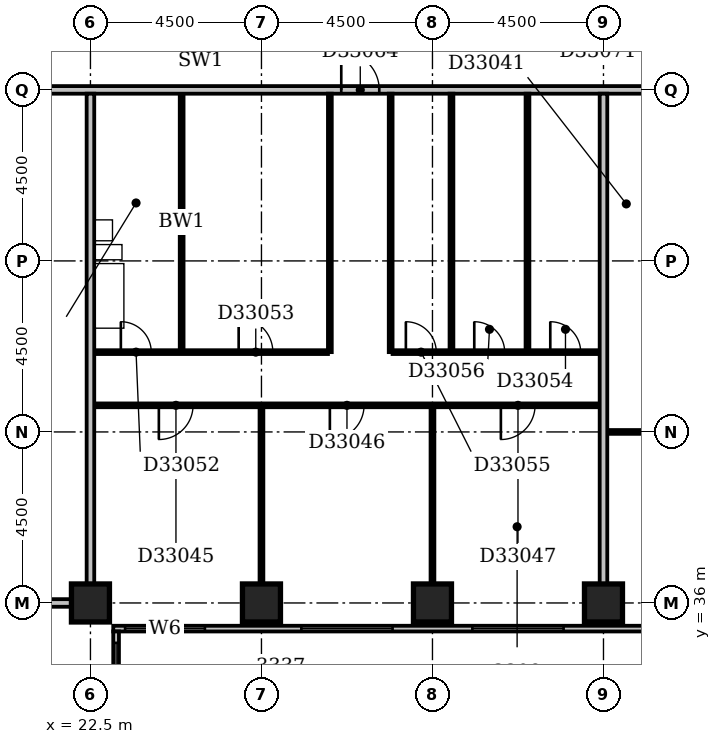
"""IFC4 building model, lengths in metres.
Left out: names, types, materials, properties, quantities, classifications, styles, units other than length and angle.
Written with IfcOpenShell. Run it as: python <this file> out.ifc"""

import sys

from ifc_helpers import new_model, si_unit, direction, frame, frame_2d, origin, origin_2d, place, context, subcontext, project, spatial, rectangle, extrude, element, fill, save


model = new_model("IFC4")
c1 = context("Model", 3, precision=1e-05, world=origin(), true_north=direction((0.0, 1.0)))
c2 = subcontext(c1, "Body", "Model", "MODEL_VIEW")
j1 = project(units=[si_unit("LENGTHUNIT", "METRE"), si_unit("PLANEANGLEUNIT", "RADIAN")], contexts=[c1])
p1 = place(None, origin())
s1 = spatial("IfcSite", under=j1, at=p1, CompositionType="ELEMENT")
p2 = place(p1, origin())
s2 = spatial("IfcBuilding", under=s1, at=p2, CompositionType="ELEMENT")
p3 = place(p2, frame((0.0, 0.0, 134.0)))
s3 = spatial("IfcBuildingStorey", under=s2, at=p3, CompositionType="ELEMENT", Elevation=134.0)
for number, where, z_axis, x_axis in (
    (1, (22.5, 36.0, -0.3), (0.0, 0.0, 1.0), (1.0, 0.0, 0.0)),
    (2, (27.0, 36.0, -0.3), (0.0, 0.0, 1.0), (1.0, 0.0, 0.0)),
    (3, (31.5, 36.0, -0.3), (0.0, 0.0, 1.0), (1.0, 0.0, 0.0)),
    (4, (36.0, 36.0, -0.3), (0.0, 0.0, 1.0), (1.0, 0.0, 0.0)),
):
    element("IfcColumn", number, at=place(p3, frame(where, z_axis=z_axis, x_axis=x_axis)), inside=s3, PredefinedType="COLUMN", context=c2, shape_type="SweptSolid", body=[
        extrude(rectangle(XDim=1.0, YDim=1.0, at=origin_2d()), origin(), (0.0, 0.0, 1.0), 3.6),
    ])
p4 = place(p3, frame((23.175, 17.4, 0.0), z_axis=(0.0, 0.0, 1.0), x_axis=(0.0, 1.0, 0.0)))
e5 = element("IfcWall", 5, at=p4, inside=s3, PredefinedType="STANDARD", context=c2, shape_type="SweptSolid", body=[
    extrude(rectangle(XDim=17.85, YDim=0.15, at=frame_2d((8.925, 0.0))), origin(), (0.0, 0.0, 1.0), 2.7),
])
p5 = place(p4, frame((1.385, 0.0, 0.6)))
e6 = element("IfcOpeningElement", 6, at=p5, cuts=e5, PredefinedType="OPENING", context=c2, shape_type="SweptSolid", body=[
    extrude(rectangle(XDim=2.1, YDim=1.8, at=frame_2d((1.05, 0.9))), frame((0.0, 0.087, 0.0), z_axis=(0.0, -1.0, 0.0), x_axis=(1.0, 0.0, 0.0)), (0.0, 0.0, 1.0), 0.174),
])
p6 = place(p4, frame((6.15, 0.0, 0.6)))
e7 = element("IfcOpeningElement", 7, at=p6, cuts=e5, PredefinedType="OPENING", context=c2, shape_type="SweptSolid", body=[
    extrude(rectangle(XDim=2.4, YDim=1.8, at=frame_2d((1.2, 0.9))), frame((0.0, 0.087, 0.0), z_axis=(0.0, -1.0, 0.0), x_axis=(1.0, 0.0, 0.0)), (0.0, 0.0, 1.0), 0.174),
])
p7 = place(p4, frame((10.65, 0.0, 0.6)))
e8 = element("IfcOpeningElement", 8, at=p7, cuts=e5, PredefinedType="OPENING", context=c2, shape_type="SweptSolid", body=[
    extrude(rectangle(XDim=2.4, YDim=1.8, at=frame_2d((1.2, 0.9))), frame((0.0, 0.087, 0.0), z_axis=(0.0, -1.0, 0.0), x_axis=(1.0, 0.0, 0.0)), (0.0, 0.0, 1.0), 0.174),
])
p8 = place(p4, frame((15.15, 0.0, 0.6)))
e9 = element("IfcOpeningElement", 9, at=p8, cuts=e5, PredefinedType="OPENING", context=c2, shape_type="SweptSolid", body=[
    extrude(rectangle(XDim=2.4, YDim=1.8, at=frame_2d((1.2, 0.9))), frame((0.0, 0.087, 0.0), z_axis=(0.0, -1.0, 0.0), x_axis=(1.0, 0.0, 0.0)), (0.0, 0.0, 1.0), 0.174),
])
p9 = place(p3, frame((23.1, 35.325, 0.0), z_axis=(0.0, 0.0, 1.0), x_axis=(1.0, 0.0, 0.0)))
e10 = element("IfcWall", 10, at=p9, inside=s3, PredefinedType="STANDARD", context=c2, shape_type="SweptSolid", body=[
    extrude(rectangle(XDim=45.15, YDim=0.15, at=frame_2d((22.575, 0.0))), origin(), (0.0, 0.0, 1.0), 2.7),
])
p10 = place(p9, frame((0.312, 0.0, 0.6)))
e11 = element("IfcOpeningElement", 11, at=p10, cuts=e10, PredefinedType="OPENING", context=c2, shape_type="SweptSolid", body=[
    extrude(rectangle(XDim=2.1, YDim=1.8, at=frame_2d((1.05, 0.9))), frame((0.0, 0.087, 0.0), z_axis=(0.0, -1.0, 0.0), x_axis=(1.0, 0.0, 0.0)), (0.0, 0.0, 1.0), 0.174),
])
p11 = place(p9, frame((4.95, 0.0, 0.6)))
e12 = element("IfcOpeningElement", 12, at=p11, cuts=e10, PredefinedType="OPENING", context=c2, shape_type="SweptSolid", body=[
    extrude(rectangle(XDim=2.4, YDim=1.8, at=frame_2d((1.2, 0.9))), frame((0.0, 0.087, 0.0), z_axis=(0.0, -1.0, 0.0), x_axis=(1.0, 0.0, 0.0)), (0.0, 0.0, 1.0), 0.174),
])
p12 = place(p9, frame((9.45, 0.0, 0.6)))
e13 = element("IfcOpeningElement", 13, at=p12, cuts=e10, PredefinedType="OPENING", context=c2, shape_type="SweptSolid", body=[
    extrude(rectangle(XDim=2.4, YDim=1.8, at=frame_2d((1.2, 0.9))), frame((0.0, 0.087, 0.0), z_axis=(0.0, -1.0, 0.0), x_axis=(1.0, 0.0, 0.0)), (0.0, 0.0, 1.0), 0.174),
])
p13 = place(p9, frame((13.95, 0.0, 0.6)))
e14 = element("IfcOpeningElement", 14, at=p13, cuts=e10, PredefinedType="OPENING", context=c2, shape_type="SweptSolid", body=[
    extrude(rectangle(XDim=2.4, YDim=1.8, at=frame_2d((1.2, 0.9))), frame((0.0, 0.087, 0.0), z_axis=(0.0, -1.0, 0.0), x_axis=(1.0, 0.0, 0.0)), (0.0, 0.0, 1.0), 0.174),
])
p14 = place(p9, frame((18.45, 0.0, 0.6)))
e15 = element("IfcOpeningElement", 15, at=p14, cuts=e10, PredefinedType="OPENING", context=c2, shape_type="SweptSolid", body=[
    extrude(rectangle(XDim=2.4, YDim=1.8, at=frame_2d((1.2, 0.9))), frame((0.0, 0.087, 0.0), z_axis=(0.0, -1.0, 0.0), x_axis=(1.0, 0.0, 0.0)), (0.0, 0.0, 1.0), 0.174),
])
p15 = place(p9, frame((24.146, 0.0, 0.6)))
e16 = element("IfcOpeningElement", 16, at=p15, cuts=e10, PredefinedType="OPENING", context=c2, shape_type="SweptSolid", body=[
    extrude(rectangle(XDim=1.5, YDim=1.8, at=frame_2d((0.75, 0.9))), frame((0.0, 0.087, 0.0), z_axis=(0.0, -1.0, 0.0), x_axis=(1.0, 0.0, 0.0)), (0.0, 0.0, 1.0), 0.174),
])
p16 = place(p9, frame((27.131, 0.0, 0.6)))
e17 = element("IfcOpeningElement", 17, at=p16, cuts=e10, PredefinedType="OPENING", context=c2, shape_type="SweptSolid", body=[
    extrude(rectangle(XDim=2.4, YDim=1.8, at=frame_2d((1.2, 0.9))), frame((0.0, 0.087, 0.0), z_axis=(0.0, -1.0, 0.0), x_axis=(1.0, 0.0, 0.0)), (0.0, 0.0, 1.0), 0.174),
])
p17 = place(p9, frame((31.95, 0.0, 0.6)))
e18 = element("IfcOpeningElement", 18, at=p17, cuts=e10, PredefinedType="OPENING", context=c2, shape_type="SweptSolid", body=[
    extrude(rectangle(XDim=2.4, YDim=1.8, at=frame_2d((1.2, 0.9))), frame((0.0, 0.087, 0.0), z_axis=(0.0, -1.0, 0.0), x_axis=(1.0, 0.0, 0.0)), (0.0, 0.0, 1.0), 0.174),
])
p18 = place(p9, frame((36.45, 0.0, 0.6)))
e19 = element("IfcOpeningElement", 19, at=p18, cuts=e10, PredefinedType="OPENING", context=c2, shape_type="SweptSolid", body=[
    extrude(rectangle(XDim=2.4, YDim=1.8, at=frame_2d((1.2, 0.9))), frame((0.0, 0.087, 0.0), z_axis=(0.0, -1.0, 0.0), x_axis=(1.0, 0.0, 0.0)), (0.0, 0.0, 1.0), 0.174),
])
p19 = place(p9, frame((40.95, 0.0, 0.6)))
e20 = element("IfcOpeningElement", 20, at=p19, cuts=e10, PredefinedType="OPENING", context=c2, shape_type="SweptSolid", body=[
    extrude(rectangle(XDim=2.4, YDim=1.8, at=frame_2d((1.2, 0.9))), frame((0.0, 0.087, 0.0), z_axis=(0.0, -1.0, 0.0), x_axis=(1.0, 0.0, 0.0)), (0.0, 0.0, 1.0), 0.174),
])
for number, where, z_axis, x_axis in (
    (21, (9.1, 36.0, 0.0), (0.0, 0.0, 1.0), (1.0, 0.0, 0.0)),
    (22, (22.5, 36.5, 0.0), (0.0, 0.0, 1.0), (0.0, 1.0, 0.0)),
):
    element("IfcWall", number, at=place(p3, frame(where, z_axis=z_axis, x_axis=x_axis)), inside=s3, PredefinedType="PARTITIONING", context=c2, shape_type="SweptSolid", body=[
        extrude(rectangle(XDim=12.9, YDim=0.2, at=frame_2d((6.45, 0.0))), origin(), (0.0, 0.0, 1.0), 3.3),
    ])
p20 = place(p3, frame((27.0, 36.5, 0.0), z_axis=(0.0, 0.0, 1.0), x_axis=(0.0, 1.0, 0.0)))
e23 = element("IfcWall", 23, at=p20, inside=s3, PredefinedType="PARTITIONING", context=c2, shape_type="SweptSolid", body=[
    extrude(rectangle(XDim=4.65, YDim=0.1, at=frame_2d((2.325, 0.0))), origin(), (0.0, 0.0, 1.0), 2.6),
])
p21 = place(p3, frame((31.5, 36.5, 0.0), z_axis=(0.0, 0.0, 1.0), x_axis=(0.0, 1.0, 0.0)))
e24 = element("IfcWall", 24, at=p21, inside=s3, PredefinedType="PARTITIONING", context=c2, shape_type="SweptSolid", body=[
    extrude(rectangle(XDim=4.65, YDim=0.1, at=frame_2d((2.325, 0.0))), origin(), (0.0, 0.0, 1.0), 3.3),
])
p22 = place(p3, frame((36.0, 36.5, 0.0), z_axis=(0.0, 0.0, 1.0), x_axis=(0.0, 1.0, 0.0)))
e25 = element("IfcWall", 25, at=p22, inside=s3, PredefinedType="PARTITIONING", context=c2, shape_type="SweptSolid", body=[
    extrude(rectangle(XDim=12.9, YDim=0.2, at=frame_2d((6.45, 0.0))), origin(), (0.0, 0.0, 1.0), 2.4),
])
p23 = place(p3, frame((36.1, 40.5, 0.0), z_axis=(0.0, 0.0, 1.0), x_axis=(1.0, 0.0, 0.0)))
e26 = element("IfcWall", 26, at=p23, inside=s3, PredefinedType="PARTITIONING", context=c2, shape_type="SweptSolid", body=[
    extrude(rectangle(XDim=4.3, YDim=0.1, at=frame_2d((2.15, 0.0))), origin(), (0.0, 0.0, 1.0), 3.3),
])
p24 = place(p23, frame((1.7, 0.0, 0.0)))
e27 = element("IfcOpeningElement", 27, at=p24, cuts=e26, PredefinedType="OPENING", context=c2, shape_type="SweptSolid", body=[
    extrude(rectangle(XDim=0.9, YDim=2.1, at=frame_2d((0.45, 1.05))), frame((0.0, 0.062, 0.0), z_axis=(0.0, -1.0, 0.0), x_axis=(1.0, 0.0, 0.0)), (0.0, 0.0, 1.0), 0.124),
])
p25 = place(p3, frame((22.6, 41.2, 0.0), z_axis=(0.0, 0.0, 1.0), x_axis=(1.0, 0.0, 0.0)))
e28 = element("IfcWall", 28, at=p25, inside=s3, PredefinedType="PARTITIONING", context=c2, shape_type="SweptSolid", body=[
    extrude(rectangle(XDim=13.3, YDim=0.1, at=frame_2d((6.65, 0.0))), origin(), (0.0, 0.0, 1.0), 3.3),
])
p26 = place(p25, frame((1.7, 0.0, 0.0)))
e29 = element("IfcOpeningElement", 29, at=p26, cuts=e28, PredefinedType="OPENING", context=c2, shape_type="SweptSolid", body=[
    extrude(rectangle(XDim=0.9, YDim=2.1, at=frame_2d((0.45, 1.05))), frame((0.0, 0.062, 0.0), z_axis=(0.0, -1.0, 0.0), x_axis=(1.0, 0.0, 0.0)), (0.0, 0.0, 1.0), 0.124),
])
p27 = place(p25, frame((6.2, 0.0, 0.0)))
e30 = element("IfcOpeningElement", 30, at=p27, cuts=e28, PredefinedType="OPENING", context=c2, shape_type="SweptSolid", body=[
    extrude(rectangle(XDim=0.9, YDim=2.1, at=frame_2d((0.45, 1.05))), frame((0.0, 0.062, 0.0), z_axis=(0.0, -1.0, 0.0), x_axis=(1.0, 0.0, 0.0)), (0.0, 0.0, 1.0), 0.124),
])
p28 = place(p25, frame((10.7, 0.0, 0.0)))
e31 = element("IfcOpeningElement", 31, at=p28, cuts=e28, PredefinedType="OPENING", context=c2, shape_type="SweptSolid", body=[
    extrude(rectangle(XDim=0.9, YDim=2.1, at=frame_2d((0.45, 1.05))), frame((0.0, 0.062, 0.0), z_axis=(0.0, -1.0, 0.0), x_axis=(1.0, 0.0, 0.0)), (0.0, 0.0, 1.0), 0.124),
])
p29 = place(p3, frame((22.6, 42.6, 0.0), z_axis=(0.0, 0.0, 1.0), x_axis=(1.0, 0.0, 0.0)))
e32 = element("IfcWall", 32, at=p29, inside=s3, PredefinedType="PARTITIONING", context=c2, shape_type="SweptSolid", body=[
    extrude(rectangle(XDim=6.15, YDim=0.1, at=frame_2d((3.075, 0.0))), origin(), (0.0, 0.0, 1.0), 3.3),
])
p30 = place(p29, frame((0.7, 0.0, 0.0)))
e33 = element("IfcOpeningElement", 33, at=p30, cuts=e32, PredefinedType="OPENING", context=c2, shape_type="SweptSolid", body=[
    extrude(rectangle(XDim=0.8, YDim=2.1, at=frame_2d((0.4, 1.05))), frame((0.0, 0.062, 0.0), z_axis=(0.0, -1.0, 0.0), x_axis=(1.0, 0.0, 0.0)), (0.0, 0.0, 1.0), 0.124),
])
p31 = place(p29, frame((3.8, 0.0, 0.0)))
e34 = element("IfcOpeningElement", 34, at=p31, cuts=e32, PredefinedType="OPENING", context=c2, shape_type="SweptSolid", body=[
    extrude(rectangle(XDim=0.9, YDim=2.1, at=frame_2d((0.45, 1.05))), frame((0.0, 0.062, 0.0), z_axis=(0.0, -1.0, 0.0), x_axis=(1.0, 0.0, 0.0)), (0.0, 0.0, 1.0), 0.124),
])
for number, where, z_axis, x_axis in (
    (35, (28.8, 42.6, 0.0), (0.0, 0.0, 1.0), (0.0, 1.0, 0.0)),
    (36, (30.4, 42.6, 0.0), (0.0, 0.0, 1.0), (0.0, 1.0, 0.0)),
):
    element("IfcWall", number, at=place(p3, frame(where, z_axis=z_axis, x_axis=x_axis)), inside=s3, PredefinedType="PARTITIONING", context=c2, shape_type="SweptSolid", body=[
        extrude(rectangle(XDim=6.8, YDim=0.1, at=frame_2d((3.4, 0.0))), origin(), (0.0, 0.0, 1.0), 3.3),
    ])
p32 = place(p3, frame((30.45, 42.6, 0.0), z_axis=(0.0, 0.0, 1.0), x_axis=(1.0, 0.0, 0.0)))
e37 = element("IfcWall", 37, at=p32, inside=s3, PredefinedType="PARTITIONING", context=c2, shape_type="SweptSolid", body=[
    extrude(rectangle(XDim=5.45, YDim=0.1, at=frame_2d((2.725, 0.0))), origin(), (0.0, 0.0, 1.0), 3.3),
])
p33 = place(p32, frame((4.15, 0.0, 0.0)))
e38 = element("IfcOpeningElement", 38, at=p33, cuts=e37, PredefinedType="OPENING", context=c2, shape_type="SweptSolid", body=[
    extrude(rectangle(XDim=0.8, YDim=2.1, at=frame_2d((0.4, 1.05))), frame((0.0, 0.062, 0.0), z_axis=(0.0, -1.0, 0.0), x_axis=(1.0, 0.0, 0.0)), (0.0, 0.0, 1.0), 0.124),
])
p34 = place(p32, frame((0.35, 0.0, 0.0)))
e39 = element("IfcOpeningElement", 39, at=p34, cuts=e37, PredefinedType="OPENING", context=c2, shape_type="SweptSolid", body=[
    extrude(rectangle(XDim=0.8, YDim=2.1, at=frame_2d((0.4, 1.05))), frame((0.0, 0.062, 0.0), z_axis=(0.0, -1.0, 0.0), x_axis=(1.0, 0.0, 0.0)), (0.0, 0.0, 1.0), 0.124),
])
p35 = place(p32, frame((2.15, 0.0, 0.0)))
e40 = element("IfcOpeningElement", 40, at=p35, cuts=e37, PredefinedType="OPENING", context=c2, shape_type="SweptSolid", body=[
    extrude(rectangle(XDim=0.8, YDim=2.1, at=frame_2d((0.4, 1.05))), frame((0.0, 0.062, 0.0), z_axis=(0.0, -1.0, 0.0), x_axis=(1.0, 0.0, 0.0)), (0.0, 0.0, 1.0), 0.124),
])
p36 = place(p3, frame((24.9, 42.65, 0.0), z_axis=(0.0, 0.0, 1.0), x_axis=(0.0, 1.0, 0.0)))
e41 = element("IfcWall", 41, at=p36, inside=s3, PredefinedType="PLUMBINGWALL", context=c2, shape_type="SweptSolid", body=[
    extrude(rectangle(XDim=6.75, YDim=0.1, at=frame_2d((3.375, 0.0))), origin(), (0.0, 0.0, 1.0), 3.3),
])
for number, where, z_axis, x_axis in (
    (42, (32.0, 42.65, 0.0), (0.0, 0.0, 1.0), (0.0, 1.0, 0.0)),
    (43, (34.0, 42.65, 0.0), (0.0, 0.0, 1.0), (0.0, 1.0, 0.0)),
):
    element("IfcWall", number, at=place(p3, frame(where, z_axis=z_axis, x_axis=x_axis)), inside=s3, PredefinedType="PARTITIONING", context=c2, shape_type="SweptSolid", body=[
        extrude(rectangle(XDim=6.75, YDim=0.1, at=frame_2d((3.375, 0.0))), origin(), (0.0, 0.0, 1.0), 3.3),
    ])
p37 = place(p3, frame((9.1, 49.5, 0.0), z_axis=(0.0, 0.0, 1.0), x_axis=(1.0, 0.0, 0.0)))
e44 = element("IfcWall", 44, at=p37, inside=s3, PredefinedType="PARTITIONING", context=c2, shape_type="SweptSolid", body=[
    extrude(rectangle(XDim=28.05, YDim=0.2, at=frame_2d((14.025, 0.0))), origin(), (0.0, 0.0, 1.0), 3.3),
])
p38 = place(p37, frame((20.0, 0.0, 0.0)))
e45 = element("IfcOpeningElement", 45, at=p38, cuts=e44, PredefinedType="OPENING", context=c2, shape_type="SweptSolid", body=[
    extrude(rectangle(XDim=1.0, YDim=2.1, at=frame_2d((0.5, 1.05))), frame((0.0, 0.112, 0.0), z_axis=(0.0, -1.0, 0.0), x_axis=(1.0, 0.0, 0.0)), (0.0, 0.0, 1.0), 0.224),
])
p39 = place(p37, frame((3.9, 0.0, 0.0)))
e46 = element("IfcOpeningElement", 46, at=p39, cuts=e44, PredefinedType="OPENING", context=c2, shape_type="SweptSolid", body=[
    extrude(rectangle(XDim=0.9, YDim=2.1, at=frame_2d((0.45, 1.05))), frame((0.0, 0.112, 0.0), z_axis=(0.0, -1.0, 0.0), x_axis=(1.0, 0.0, 0.0)), (0.0, 0.0, 1.0), 0.224),
])
p40 = place(p8, origin())
e47 = element("IfcWindow", 47, at=p40, inside=s3, PartitioningType="SINGLE_PANEL", PredefinedType="WINDOW", context=c2, shape_type="SweptSolid", body=[
    extrude(rectangle(XDim=2.4, YDim=1.8, at=frame_2d((1.2, 0.9))), frame((0.0, 0.03, 0.0), z_axis=(0.0, -1.0, 0.0), x_axis=(1.0, 0.0, 0.0)), (0.0, 0.0, 1.0), 0.06),
])
fill(e9, e47)
p41 = place(p10, origin())
e48 = element("IfcWindow", 48, at=p41, inside=s3, PartitioningType="SINGLE_PANEL", PredefinedType="WINDOW", context=c2, shape_type="SweptSolid", body=[
    extrude(rectangle(XDim=2.1, YDim=1.8, at=frame_2d((1.05, 0.9))), frame((0.0, 0.03, 0.0), z_axis=(0.0, -1.0, 0.0), x_axis=(1.0, 0.0, 0.0)), (0.0, 0.0, 1.0), 0.06),
])
fill(e11, e48)
p42 = place(p11, origin())
e49 = element("IfcWindow", 49, at=p42, inside=s3, PartitioningType="SINGLE_PANEL", PredefinedType="WINDOW", context=c2, shape_type="SweptSolid", body=[
    extrude(rectangle(XDim=2.4, YDim=1.8, at=frame_2d((1.2, 0.9))), frame((0.0, 0.03, 0.0), z_axis=(0.0, -1.0, 0.0), x_axis=(1.0, 0.0, 0.0)), (0.0, 0.0, 1.0), 0.06),
])
fill(e12, e49)
p43 = place(p12, origin())
e50 = element("IfcWindow", 50, at=p43, inside=s3, PartitioningType="SINGLE_PANEL", PredefinedType="WINDOW", context=c2, shape_type="SweptSolid", body=[
    extrude(rectangle(XDim=2.4, YDim=1.8, at=frame_2d((1.2, 0.9))), frame((0.0, 0.03, 0.0), z_axis=(0.0, -1.0, 0.0), x_axis=(1.0, 0.0, 0.0)), (0.0, 0.0, 1.0), 0.06),
])
fill(e13, e50)
p44 = place(p26, frame((0.9, 0.0, 0.0), z_axis=(0.0, 0.0, 1.0), x_axis=(-1.0, 0.0, 0.0)))
e51 = element("IfcDoor", 51, at=p44, inside=s3, OperationType="SINGLE_SWING_RIGHT", PredefinedType="DOOR", context=c2, shape_type="SweptSolid", body=[
    extrude(rectangle(XDim=0.9, YDim=2.1, at=frame_2d((0.45, 1.05))), frame((0.0, 0.025, 0.0), z_axis=(0.0, -1.0, 0.0), x_axis=(1.0, 0.0, 0.0)), (0.0, 0.0, 1.0), 0.05),
])
fill(e29, e51)
p45 = place(p27, frame((0.9, 0.0, 0.0), z_axis=(0.0, 0.0, 1.0), x_axis=(-1.0, 0.0, 0.0)))
e52 = element("IfcDoor", 52, at=p45, inside=s3, OperationType="SINGLE_SWING_RIGHT", PredefinedType="DOOR", context=c2, shape_type="SweptSolid", body=[
    extrude(rectangle(XDim=0.9, YDim=2.1, at=frame_2d((0.45, 1.05))), frame((0.0, 0.025, 0.0), z_axis=(0.0, -1.0, 0.0), x_axis=(1.0, 0.0, 0.0)), (0.0, 0.0, 1.0), 0.05),
])
fill(e30, e52)
p46 = place(p28, frame((0.9, 0.0, 0.0), z_axis=(0.0, 0.0, 1.0), x_axis=(-1.0, 0.0, 0.0)))
e53 = element("IfcDoor", 53, at=p46, inside=s3, OperationType="SINGLE_SWING_RIGHT", PredefinedType="DOOR", context=c2, shape_type="SweptSolid", body=[
    extrude(rectangle(XDim=0.9, YDim=2.1, at=frame_2d((0.45, 1.05))), frame((0.0, 0.025, 0.0), z_axis=(0.0, -1.0, 0.0), x_axis=(1.0, 0.0, 0.0)), (0.0, 0.0, 1.0), 0.05),
])
fill(e31, e53)
p47 = place(p30, origin())
e54 = element("IfcDoor", 54, at=p47, inside=s3, OperationType="SINGLE_SWING_LEFT", PredefinedType="DOOR", context=c2, shape_type="SweptSolid", body=[
    extrude(rectangle(XDim=0.8, YDim=2.1, at=frame_2d((0.4, 1.05))), frame((0.0, 0.025, 0.0), z_axis=(0.0, -1.0, 0.0), x_axis=(1.0, 0.0, 0.0)), (0.0, 0.0, 1.0), 0.05),
])
fill(e33, e54)
p48 = place(p31, origin())
e55 = element("IfcDoor", 55, at=p48, inside=s3, OperationType="SINGLE_SWING_LEFT", PredefinedType="DOOR", context=c2, shape_type="SweptSolid", body=[
    extrude(rectangle(XDim=0.9, YDim=2.1, at=frame_2d((0.45, 1.05))), frame((0.0, 0.025, 0.0), z_axis=(0.0, -1.0, 0.0), x_axis=(1.0, 0.0, 0.0)), (0.0, 0.0, 1.0), 0.05),
])
fill(e34, e55)
p49 = place(p33, origin())
e56 = element("IfcDoor", 56, at=p49, inside=s3, OperationType="SINGLE_SWING_LEFT", PredefinedType="DOOR", context=c2, shape_type="SweptSolid", body=[
    extrude(rectangle(XDim=0.8, YDim=2.1, at=frame_2d((0.4, 1.05))), frame((0.0, 0.025, 0.0), z_axis=(0.0, -1.0, 0.0), x_axis=(1.0, 0.0, 0.0)), (0.0, 0.0, 1.0), 0.05),
])
fill(e38, e56)
p50 = place(p34, origin())
e57 = element("IfcDoor", 57, at=p50, inside=s3, OperationType="SINGLE_SWING_LEFT", PredefinedType="DOOR", context=c2, shape_type="SweptSolid", body=[
    extrude(rectangle(XDim=0.8, YDim=2.1, at=frame_2d((0.4, 1.05))), frame((0.0, 0.025, 0.0), z_axis=(0.0, -1.0, 0.0), x_axis=(1.0, 0.0, 0.0)), (0.0, 0.0, 1.0), 0.05),
])
fill(e39, e57)
p51 = place(p35, origin())
e58 = element("IfcDoor", 58, at=p51, inside=s3, OperationType="SINGLE_SWING_LEFT", PredefinedType="DOOR", context=c2, shape_type="SweptSolid", body=[
    extrude(rectangle(XDim=0.8, YDim=2.1, at=frame_2d((0.4, 1.05))), frame((0.0, 0.025, 0.0), z_axis=(0.0, -1.0, 0.0), x_axis=(1.0, 0.0, 0.0)), (0.0, 0.0, 1.0), 0.05),
])
fill(e40, e58)
p52 = place(p38, origin())
e59 = element("IfcDoor", 59, at=p52, inside=s3, OperationType="SINGLE_SWING_LEFT", PredefinedType="DOOR", context=c2, shape_type="SweptSolid", body=[
    extrude(rectangle(XDim=1.0, YDim=2.1, at=frame_2d((0.5, 1.05))), frame((0.0, 0.025, 0.0), z_axis=(0.0, -1.0, 0.0), x_axis=(1.0, 0.0, 0.0)), (0.0, 0.0, 1.0), 0.05),
])
fill(e45, e59)
save(model, sys.argv[1])
